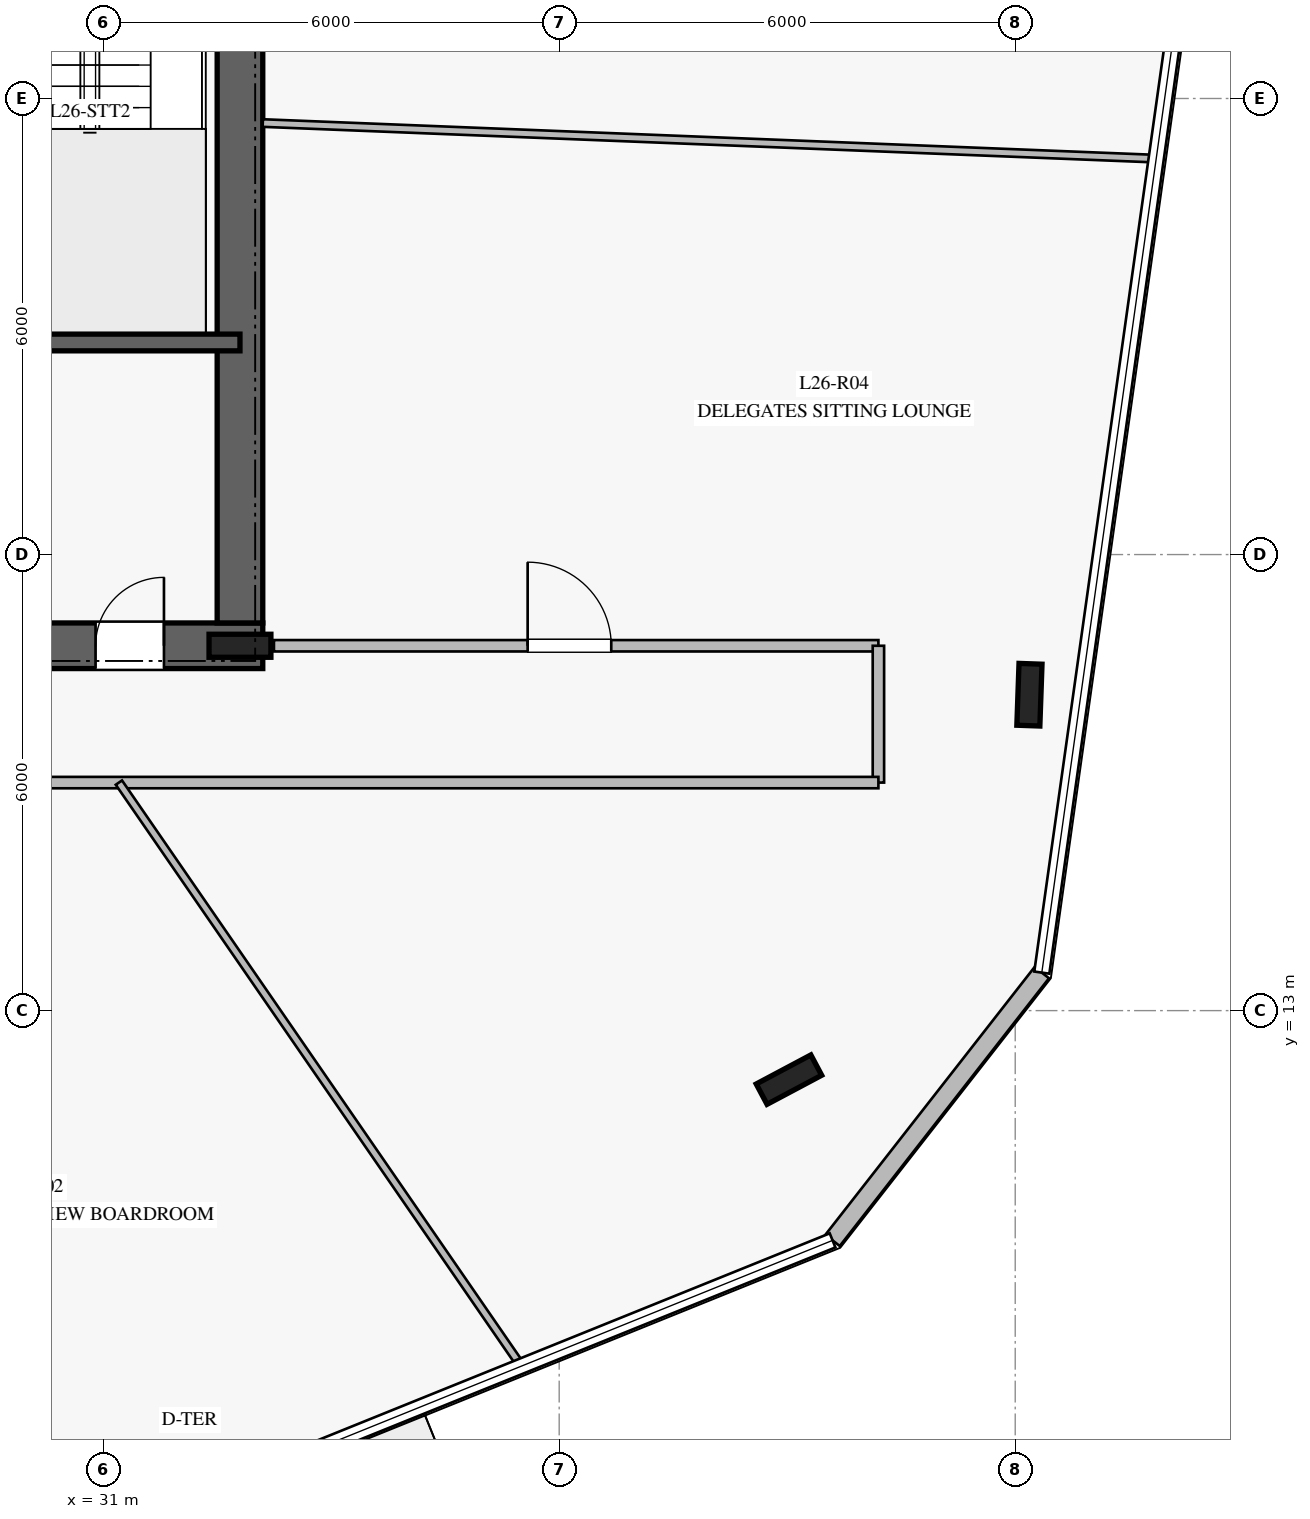
"""IFC4 building model, lengths in metres.
Left out: names, types, materials, properties, quantities, classifications, styles, units other than length and angle.
Written with IfcOpenShell. Run it as: python <this file> out.ifc"""

import sys

from ifc_helpers import new_model, si_unit, direction, frame, frame_2d, origin, origin_2d, place, context, subcontext, project, spatial, rectangle, i_section, extrude, element, fill, save


model = new_model("IFC4")
c1 = context("Model", 3, precision=1e-05, world=origin(), true_north=direction((0.0, 1.0)))
c2 = subcontext(c1, "Body", "Model", "MODEL_VIEW")
j1 = project(units=[si_unit("LENGTHUNIT", "METRE"), si_unit("PLANEANGLEUNIT", "RADIAN")], contexts=[c1])
p1 = place(None, origin())
s1 = spatial("IfcSite", under=j1, at=p1, CompositionType="ELEMENT")
p2 = place(p1, origin())
s2 = spatial("IfcBuilding", under=s1, at=p2, CompositionType="ELEMENT")
p3 = place(p2, frame((0.0, 0.0, 110.4)))
s3 = spatial("IfcBuildingStorey", under=s2, at=p3, CompositionType="ELEMENT", Elevation=110.4)
p4 = place(p3, frame((16.9, 17.8, 0.0), z_axis=(0.0, 0.0, 1.0), x_axis=(1.0, 0.0, 0.0)))
e1 = element("IfcWall", 1, at=p4, inside=s3, PredefinedType="SHEAR", context=c2, shape_type="SweptSolid", body=[
    extrude(rectangle(XDim=16.2, YDim=0.6, at=frame_2d((8.1, 0.0))), origin(), (0.0, 0.0, 1.0), 3.76),
])
p5 = place(p4, frame((5.05, 0.0, 0.0)))
e2 = element("IfcOpeningElement", 2, at=p5, cuts=e1, PredefinedType="OPENING", context=c2, shape_type="SweptSolid", body=[
    extrude(rectangle(XDim=1.2, YDim=2.25, at=frame_2d((0.6, 1.125))), frame((0.0, 0.31, 0.0), z_axis=(0.0, -1.0, 0.0), x_axis=(1.0, 0.0, 0.0)), (0.0, 0.0, 1.0), 0.62),
])
p6 = place(p4, frame((14.0, 0.0, 0.0)))
e3 = element("IfcOpeningElement", 3, at=p6, cuts=e1, PredefinedType="OPENING", context=c2, shape_type="SweptSolid", body=[
    extrude(rectangle(XDim=0.9, YDim=2.1, at=frame_2d((0.45, 1.05))), frame((0.0, 0.31, 0.0), z_axis=(0.0, -1.0, 0.0), x_axis=(1.0, 0.0, 0.0)), (0.0, 0.0, 1.0), 0.62),
])
p7 = place(p4, frame((9.25, 0.0, 0.0)))
e4 = element("IfcOpeningElement", 4, at=p7, cuts=e1, PredefinedType="OPENING", context=c2, shape_type="SweptSolid", body=[
    extrude(rectangle(XDim=1.1, YDim=2.2, at=frame_2d((0.55, 1.1))), frame((0.0, 0.31, 0.0), z_axis=(0.0, -1.0, 0.0), x_axis=(1.0, 0.0, 0.0)), (0.0, 0.0, 1.0), 0.62),
])
p8 = place(p3, frame((32.8, 18.1, 0.0), z_axis=(0.0, 0.0, 1.0), x_axis=(0.0, 1.0, 0.0)))
e5 = element("IfcWall", 5, at=p8, inside=s3, PredefinedType="SHEAR", context=c2, shape_type="SweptSolid", body=[
    extrude(rectangle(XDim=13.8, YDim=0.6, at=frame_2d((6.9, 0.0))), origin(), (0.0, 0.0, 1.0), 3.76),
])
p9 = place(p3, frame((32.8, 17.8, 0.0), z_axis=(0.0, 0.0, 1.0), x_axis=(1.0, 0.0, 0.0)))
e6 = element("IfcColumn", 6, at=p9, inside=s3, PredefinedType="COLUMN", context=c2, shape_type="SweptSolid", body=[
    extrude(i_section(OverallWidth=0.303, OverallDepth=0.814, WebThickness=0.021, FlangeThickness=0.04, at=origin_2d()), origin(), (0.0, 0.0, 1.0), 4.0),
])
p10 = place(p3, frame((29.08, 21.79, 0.0), z_axis=(0.0, 0.0, 1.0), x_axis=(1.0, 0.0, 0.0)))
e7 = element("IfcWall", 7, at=p10, inside=s3, PredefinedType="SOLIDWALL", context=c2, shape_type="SweptSolid", body=[
    extrude(rectangle(XDim=3.72, YDim=0.22, at=frame_2d((1.86, 0.0))), origin(), (0.0, 0.0, 1.0), 3.76),
])
for number, where, z_axis, x_axis in (
    (8, (40.023, 12.092, 0.0), (0.0, 0.0, 1.0), (0.883, 0.469, 0.0)),
    (9, (43.187, 17.156, 0.0), (0.0, 0.0, 1.0), (0.035, 0.999, 0.0)),
):
    element("IfcColumn", number, at=place(p3, frame(where, z_axis=z_axis, x_axis=x_axis)), inside=s3, PredefinedType="COLUMN", context=c2, shape_type="SweptSolid", body=[
        extrude(i_section(OverallWidth=0.303, OverallDepth=0.814, WebThickness=0.021, FlangeThickness=0.04, at=origin_2d()), origin(), (0.0, 0.0, 1.0), 4.0),
    ])
p11 = place(p3, frame((40.597, 9.977, 0.0), z_axis=(0.0, 0.0, 1.0), x_axis=(0.615764831552, 0.787929991956, 0.0)))
e10 = element("IfcWall", 10, at=p11, inside=s3, PredefinedType="STANDARD", context=c2, shape_type="SweptSolid", body=[
    extrude(rectangle(XDim=4.471, YDim=0.24, at=frame_2d((2.236, 0.0))), origin(), (0.0, 0.0, 1.0), 3.76),
])
p12 = place(p3, frame((33.247, 17.8, 0.0), z_axis=(0.0, 0.0, 1.0), x_axis=(1.0, 0.0, 0.0)))
e11 = element("IfcWall", 11, at=p12, inside=s3, PredefinedType="PARTITIONING", context=c2, shape_type="SweptSolid", body=[
    extrude(rectangle(XDim=7.953, YDim=0.15, at=frame_2d((3.977, 0.0))), origin(), (0.0, 0.0, 1.0), 3.05),
])
p13 = place(p12, frame((3.338, 0.0, 0.0)))
e12 = element("IfcOpeningElement", 12, at=p13, cuts=e11, PredefinedType="OPENING", context=c2, shape_type="SweptSolid", body=[
    extrude(rectangle(XDim=1.1, YDim=2.2, at=frame_2d((0.55, 1.1))), frame((0.0, 0.085, 0.0), z_axis=(0.0, -1.0, 0.0), x_axis=(1.0, 0.0, 0.0)), (0.0, 0.0, 1.0), 0.17),
])
p14 = place(p3, frame((41.2, 17.8, 0.0), z_axis=(0.0, 0.0, 1.0), x_axis=(0.0, -1.0, 0.0)))
e13 = element("IfcWall", 13, at=p14, inside=s3, PredefinedType="PARTITIONING", context=c2, shape_type="SweptSolid", body=[
    extrude(rectangle(XDim=1.8, YDim=0.15, at=frame_2d((0.9, 0.0))), origin(), (0.0, 0.0, 1.0), 3.21),
])
p15 = place(p3, frame((41.2, 16.0, 0.0), z_axis=(0.0, 0.0, 1.0), x_axis=(-1.0, 0.0, 0.0)))
e14 = element("IfcWall", 14, at=p15, inside=s3, PredefinedType="PARTITIONING", context=c2, shape_type="SweptSolid", body=[
    extrude(rectangle(XDim=15.25, YDim=0.15, at=frame_2d((7.625, 0.0))), origin(), (0.0, 0.0, 1.0), 3.21),
])
p16 = place(p15, frame((11.861, 0.0, 0.0)))
e15 = element("IfcOpeningElement", 15, at=p16, cuts=e14, PredefinedType="OPENING", context=c2, shape_type="SweptSolid", body=[
    extrude(rectangle(XDim=1.1, YDim=2.2, at=frame_2d((0.55, 1.1))), frame((0.0, 0.085, 0.0), z_axis=(0.0, -1.0, 0.0), x_axis=(1.0, 0.0, 0.0)), (0.0, 0.0, 1.0), 0.17),
])
p17 = place(p3, frame((31.207, 16.0, 0.0), z_axis=(0.0, 0.0, 1.0), x_axis=(0.567734794436, -0.82321151789, 0.0)))
e16 = element("IfcWall", 16, at=p17, inside=s3, PredefinedType="MOVABLE", context=c2, shape_type="SweptSolid", body=[
    extrude(rectangle(XDim=9.309, YDim=0.1, at=frame_2d((4.654, 0.0))), origin(), (0.0, 0.0, 1.0), 3.16),
])
p18 = place(p3, frame((33.1, 24.677, 0.0), z_axis=(0.0, 0.0, 1.0), x_axis=(0.999206030208, -0.039841049127, 0.0)))
e17 = element("IfcWall", 17, at=p18, inside=s3, PredefinedType="MOVABLE", context=c2, shape_type="SweptSolid", body=[
    extrude(rectangle(XDim=11.747, YDim=0.1, at=frame_2d((5.874, 0.0))), origin(), (0.0, 0.0, 1.0), 3.05),
])
p19 = place(p6, origin())
e18 = element("IfcDoor", 18, at=p19, inside=s3, OperationType="SINGLE_SWING_RIGHT", PredefinedType="DOOR", context=c2, shape_type="SweptSolid", body=[
    extrude(rectangle(XDim=0.9, YDim=2.1, at=frame_2d((0.45, 1.05))), frame((0.0, 0.025, 0.0), z_axis=(0.0, -1.0, 0.0), x_axis=(1.0, 0.0, 0.0)), (0.0, 0.0, 1.0), 0.05),
])
fill(e3, e18)
p20 = place(p13, origin())
e19 = element("IfcDoor", 19, at=p20, inside=s3, OperationType="SINGLE_SWING_LEFT", PredefinedType="DOOR", context=c2, shape_type="SweptSolid", body=[
    extrude(rectangle(XDim=1.1, YDim=2.2, at=frame_2d((0.55, 1.1))), frame((0.0, 0.025, 0.0), z_axis=(0.0, -1.0, 0.0), x_axis=(1.0, 0.0, 0.0)), (0.0, 0.0, 1.0), 0.05),
])
fill(e12, e19)
save(model, sys.argv[1])
